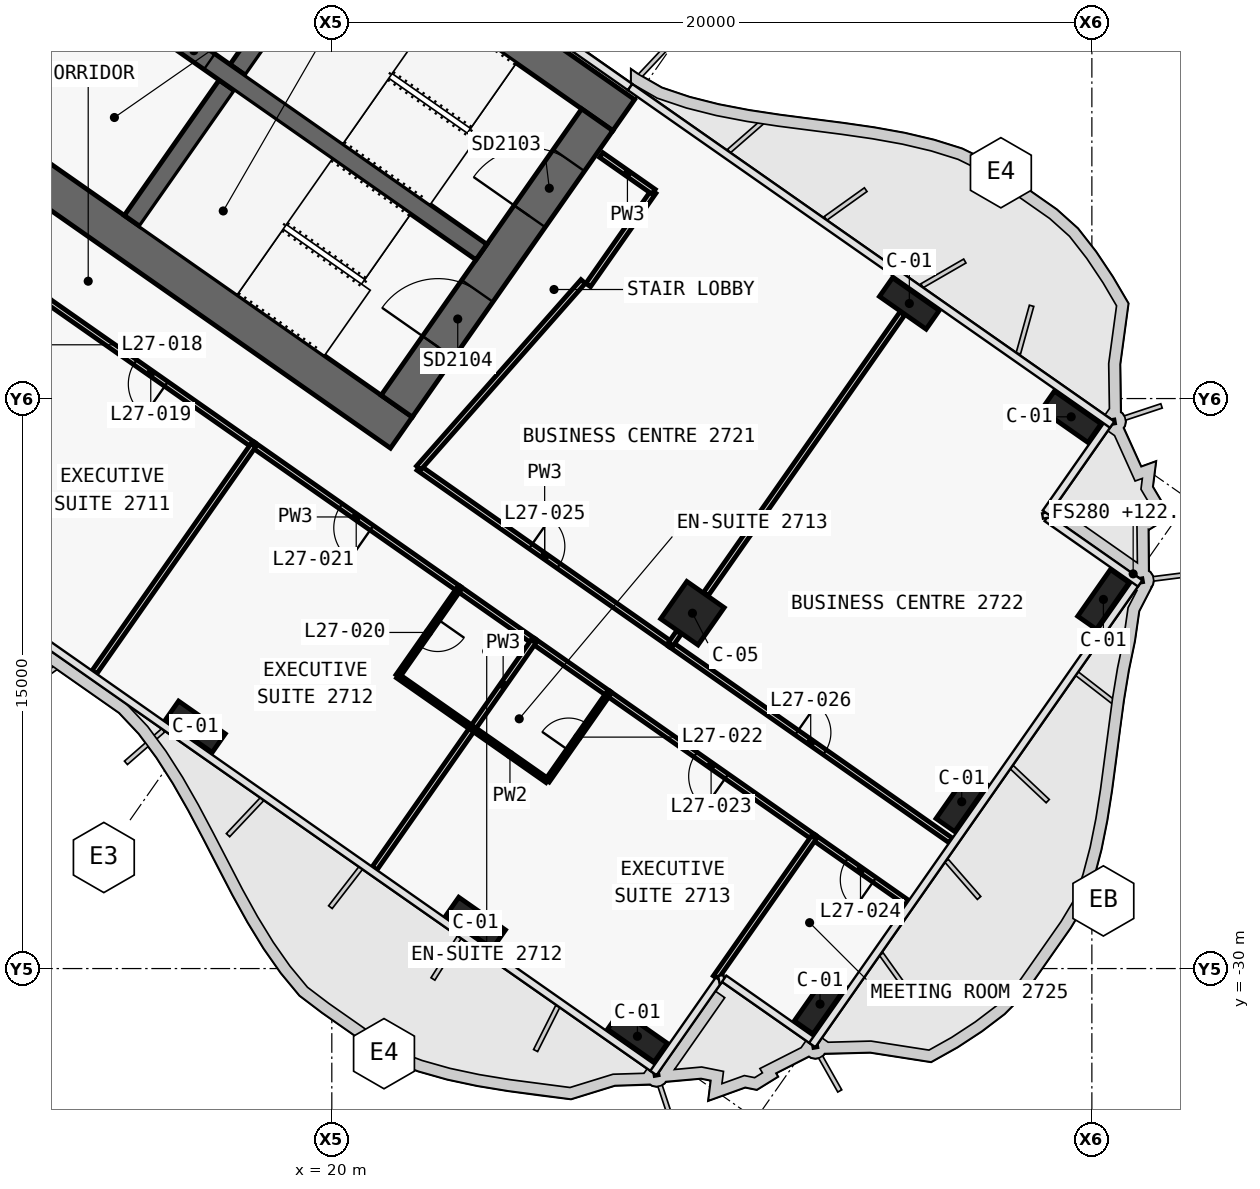
"""IFC4 building model, lengths in metres.
Left out: names, types, materials, properties, quantities, classifications, styles, units other than length and angle.
Written with IfcOpenShell. Run it as: python <this file> out.ifc"""

import sys

from ifc_helpers import new_model, si_unit, direction, frame, frame_2d, origin, origin_2d, place, context, subcontext, project, spatial, polyline, rectangle, outline, extrude, element, fill, save


model = new_model("IFC4")
c1 = context("Model", 3, precision=1e-05, world=origin(), true_north=direction((0.0, 1.0)))
c2 = subcontext(c1, "Body", "Model", "MODEL_VIEW")
j1 = project(units=[si_unit("LENGTHUNIT", "METRE"), si_unit("PLANEANGLEUNIT", "RADIAN")], contexts=[c1])
p1 = place(None, origin())
s1 = spatial("IfcSite", under=j1, at=p1, CompositionType="ELEMENT")
p2 = place(p1, origin())
s2 = spatial("IfcBuilding", under=s1, at=p2, CompositionType="ELEMENT")
p3 = place(p2, frame((0.0, 0.0, 122.9)))
s3 = spatial("IfcBuildingStorey", under=s2, at=p3, CompositionType="ELEMENT", Elevation=122.9)
p4 = place(p3, frame((-0.037, 11.867, 0.0), z_axis=(0.0, 0.0, 1.0), x_axis=(0.819155306259, -0.573571777746, 0.0)))
e1 = element("IfcWall", 1, at=p4, inside=s3, PredefinedType="SHEAR", context=c2, shape_type="SweptSolid", body=[
    extrude(outline(polyline([(33.837, 0.5), (0.0, 0.5), (0.7, -0.5), (33.837, -0.5), (33.837, 0.5)])), origin(), (0.0, 0.0, 1.0), 3.6),
])
p5 = place(p3, frame((-0.037, -0.585, 0.0), z_axis=(0.0, 0.0, 1.0), x_axis=(0.819157152511, -0.573569140985, 0.0)))
e2 = element("IfcWall", 2, at=p5, inside=s3, PredefinedType="SHEAR", context=c2, shape_type="SweptSolid", body=[
    extrude(outline(polyline([(26.695, 0.5), (0.0, 0.5), (0.7, -0.5), (26.695, -0.5), (26.695, 0.5)])), origin(), (0.0, 0.0, 1.0), 3.6),
])
p6 = place(p5, frame((1.245, 0.0, 0.0)))
e3 = element("IfcOpeningElement", 3, at=p6, cuts=e2, PredefinedType="OPENING", context=c2, shape_type="SweptSolid", body=[
    extrude(rectangle(XDim=1.5, YDim=2.1, at=frame_2d((0.75, 1.05))), frame((0.0, 0.51, 0.0), z_axis=(0.0, -1.0, 0.0), x_axis=(1.0, 0.0, 0.0)), (0.0, 0.0, 1.0), 1.02),
])
p7 = place(p5, frame((12.445, 0.0, 0.0)))
e4 = element("IfcOpeningElement", 4, at=p7, cuts=e2, PredefinedType="OPENING", context=c2, shape_type="SweptSolid", body=[
    extrude(rectangle(XDim=1.5, YDim=2.1, at=frame_2d((0.75, 1.05))), frame((0.0, 0.51, 0.0), z_axis=(0.0, -1.0, 0.0), x_axis=(1.0, 0.0, 0.0)), (0.0, 0.0, 1.0), 1.02),
])
p8 = place(p3, frame((21.708, -15.2, 0.0), z_axis=(0.0, 0.0, 1.0), x_axis=(0.573576324356, 0.819152122709, 0.0)))
e5 = element("IfcWall", 5, at=p8, inside=s3, PredefinedType="SHEAR", context=c2, shape_type="SweptSolid", body=[
    extrude(outline(polyline([(9.2, 0.5), (0.0, 0.5), (0.0, -0.5), (9.2, -0.5), (9.2, 0.5)])), origin(), (0.0, 0.0, 1.0), 3.6),
])
p9 = place(p8, frame((6.1, 0.0, 0.0)))
e6 = element("IfcOpeningElement", 6, at=p9, cuts=e5, PredefinedType="OPENING", context=c2, shape_type="SweptSolid", body=[
    extrude(rectangle(XDim=1.8, YDim=2.1, at=frame_2d((0.9, 1.05))), frame((0.0, 0.51, 0.0), z_axis=(0.0, -1.0, 0.0), x_axis=(1.0, 0.0, 0.0)), (0.0, 0.0, 1.0), 1.02),
])
p10 = place(p8, frame((1.9, 0.0, 0.0)))
e7 = element("IfcOpeningElement", 7, at=p10, cuts=e5, PredefinedType="OPENING", context=c2, shape_type="SweptSolid", body=[
    extrude(rectangle(XDim=1.8, YDim=2.1, at=frame_2d((0.9, 1.05))), frame((0.0, 0.51, 0.0), z_axis=(0.0, -1.0, 0.0), x_axis=(1.0, 0.0, 0.0)), (0.0, 0.0, 1.0), 1.02),
])
p11 = place(p3, frame((14.745, -10.324, 0.0), z_axis=(0.0, 0.0, 1.0), x_axis=(0.57356780395, 0.819158088694, 0.0)))
e8 = element("IfcWall", 8, at=p11, inside=s3, PredefinedType="SHEAR", context=c2, shape_type="SweptSolid", body=[
    extrude(outline(polyline([(0.0, 0.25), (0.0, -0.25), (4.35, -0.25), (4.35, 0.25), (0.0, 0.25)])), origin(), (0.0, 0.0, 1.0), 3.6),
])
p12 = place(p3, frame((17.527, -6.352, 0.0), z_axis=(0.0, 0.0, 1.0), x_axis=(0.573530143085, 0.819184457233, 0.0)))
e9 = element("IfcWall", 9, at=p12, inside=s3, PredefinedType="SHEAR", context=c2, shape_type="SweptSolid", body=[
    extrude(outline(polyline([(4.35, -0.25), (4.35, 0.25), (0.0, 0.25), (0.0, -0.25), (4.35, -0.25)])), origin(), (0.0, 0.0, 1.0), 3.6),
])
p13 = place(p3, frame((2.638, 3.768, 0.0), z_axis=(0.0, 0.0, 1.0), x_axis=(0.819148977158, -0.573580816643, 0.0)))
e10 = element("IfcWall", 10, at=p13, inside=s3, PredefinedType="SHEAR", context=c2, shape_type="SweptSolid", body=[
    extrude(outline(polyline([(0.0, 0.25), (0.0, -0.25), (26.0, -0.25), (26.0, 0.25), (0.0, 0.25)])), origin(), (0.0, 0.0, 1.0), 3.6),
])
p14 = place(p13, frame((9.637, 0.0, 0.0)))
e11 = element("IfcOpeningElement", 11, at=p14, cuts=e10, PredefinedType="OPENING", context=c2, shape_type="SweptSolid", body=[
    extrude(rectangle(XDim=1.2, YDim=2.1, at=frame_2d((0.6, 1.05))), frame((0.0, 0.26, 0.0), z_axis=(0.0, -1.0, 0.0), x_axis=(1.0, 0.0, 0.0)), (0.0, 0.0, 1.0), 0.52),
])
p15 = place(p13, frame((11.812, 0.0, 0.0)))
e12 = element("IfcOpeningElement", 12, at=p15, cuts=e10, PredefinedType="OPENING", context=c2, shape_type="SweptSolid", body=[
    extrude(rectangle(XDim=1.2, YDim=2.1, at=frame_2d((0.6, 1.05))), frame((0.0, 0.26, 0.0), z_axis=(0.0, -1.0, 0.0), x_axis=(1.0, 0.0, 0.0)), (0.0, 0.0, 1.0), 0.52),
])
p16 = place(p13, frame((13.988, 0.0, 0.0)))
e13 = element("IfcOpeningElement", 13, at=p16, cuts=e10, PredefinedType="OPENING", context=c2, shape_type="SweptSolid", body=[
    extrude(rectangle(XDim=1.2, YDim=2.1, at=frame_2d((0.6, 1.05))), frame((0.0, 0.26, 0.0), z_axis=(0.0, -1.0, 0.0), x_axis=(1.0, 0.0, 0.0)), (0.0, 0.0, 1.0), 0.52),
])
p17 = place(p13, frame((16.262, 0.0, 0.0)))
e14 = element("IfcOpeningElement", 14, at=p17, cuts=e10, PredefinedType="OPENING", context=c2, shape_type="SweptSolid", body=[
    extrude(rectangle(XDim=1.0, YDim=2.1, at=frame_2d((0.5, 1.05))), frame((0.0, 0.26, 0.0), z_axis=(0.0, -1.0, 0.0), x_axis=(1.0, 0.0, 0.0)), (0.0, 0.0, 1.0), 0.52),
])
for number, where, z_axis, x_axis in (
    (15, (16.41, -23.637, 0.0), (0.0, 0.0, 1.0), (0.819, -0.574, 0.0)),
    (16, (23.782, -28.799, 0.0), (0.0, 0.0, 1.0), (0.819, -0.574, 0.0)),
    (17, (28.042, -31.782, 0.0), (0.0, 0.0, 1.0), (0.819, -0.574, 0.0)),
    (18, (35.197, -12.498, 0.0), (0.0, 0.0, 1.0), (0.819, -0.574, 0.0)),
    (19, (39.456, -15.481, 0.0), (0.0, 0.0, 1.0), (0.819, -0.574, 0.0)),
    (20, (32.847, -30.935, 0.0), (0.0, 0.0, 1.0), (0.574, 0.819, 0.0)),
    (21, (36.575, -25.61, 0.0), (0.0, 0.0, 1.0), (0.574, 0.819, 0.0)),
    (22, (40.303, -20.286, 0.0), (0.0, 0.0, 1.0), (0.574, 0.819, 0.0)),
):
    element("IfcColumn", number, at=place(p3, frame(where, z_axis=z_axis, x_axis=x_axis)), inside=s3, PredefinedType="COLUMN", context=c2, shape_type="SweptSolid", body=[
        extrude(rectangle(XDim=1.5, YDim=0.6, at=origin_2d()), origin(), (0.0, 0.0, 1.0), 3.6),
    ])
p18 = place(p3, frame((29.49, -20.649, 0.0), z_axis=(0.0, 0.0, 1.0), x_axis=(0.819152044289, -0.573576436351, 0.0)))
e23 = element("IfcColumn", 23, at=p18, inside=s3, PredefinedType="COLUMN", context=c2, shape_type="SweptSolid", body=[
    extrude(rectangle(XDim=1.2, YDim=1.2, at=origin_2d()), origin(), (0.0, 0.0, 1.0), 3.6),
])
p19 = place(p3, frame((22.284, -16.824, 0.0), z_axis=(0.0, 0.0, 1.0), x_axis=(0.819152599934, -0.573575642807, 0.0)))
e24 = element("IfcWall", 24, at=p19, inside=s3, PredefinedType="PARTITIONING", context=c2, shape_type="SweptSolid", body=[
    extrude(rectangle(XDim=8.098, YDim=0.15, at=frame_2d((4.049, 0.0))), origin(), (0.0, 0.0, 1.0), 2.6),
])
p20 = place(p19, frame((3.599, 0.0, 0.0)))
e25 = element("IfcOpeningElement", 25, at=p20, cuts=e24, PredefinedType="OPENING", context=c2, shape_type="SweptSolid", body=[
    extrude(rectangle(XDim=0.9, YDim=2.1, at=frame_2d((0.45, 1.05))), frame((0.0, 0.085, 0.0), z_axis=(0.0, -1.0, 0.0), x_axis=(1.0, 0.0, 0.0)), (0.0, 0.0, 1.0), 0.17),
])
p21 = place(p3, frame((28.914, -21.467, 0.0), z_axis=(0.0, 0.0, 1.0), x_axis=(0.81915291695, -0.57357519006, 0.0)))
e26 = element("IfcWall", 26, at=p21, inside=s3, PredefinedType="PARTITIONING", context=c2, shape_type="SweptSolid", body=[
    extrude(rectangle(XDim=9.002, YDim=0.15, at=frame_2d((4.501, 0.0))), origin(), (0.0, 0.0, 1.0), 2.5),
])
p22 = place(p21, frame((4.051, 0.0, 0.0)))
e27 = element("IfcOpeningElement", 27, at=p22, cuts=e26, PredefinedType="OPENING", context=c2, shape_type="SweptSolid", body=[
    extrude(rectangle(XDim=0.9, YDim=2.1, at=frame_2d((0.45, 1.05))), frame((0.0, 0.085, 0.0), z_axis=(0.0, -1.0, 0.0), x_axis=(1.0, 0.0, 0.0)), (0.0, 0.0, 1.0), 0.17),
])
p23 = place(p3, frame((17.941, -16.224, 0.0), z_axis=(0.0, 0.0, 1.0), x_axis=(-0.819153746897, 0.573574004767, 0.0)))
e28 = element("IfcWall", 28, at=p23, inside=s3, PredefinedType="PARTITIONING", context=c2, shape_type="SweptSolid", body=[
    extrude(rectangle(XDim=6.603, YDim=0.15, at=frame_2d((3.302, 0.0))), origin(), (0.0, 0.0, 1.0), 2.6),
])
p24 = place(p23, frame((2.802, 0.0, 0.0)))
e29 = element("IfcOpeningElement", 29, at=p24, cuts=e28, PredefinedType="OPENING", context=c2, shape_type="SweptSolid", body=[
    extrude(rectangle(XDim=1.0, YDim=2.1, at=frame_2d((0.5, 1.05))), frame((0.0, 0.085, 0.0), z_axis=(0.0, -1.0, 0.0), x_axis=(1.0, 0.0, 0.0)), (0.0, 0.0, 1.0), 0.17),
])
p25 = place(p3, frame((23.346, -20.01, 0.0), z_axis=(0.0, 0.0, 1.0), x_axis=(-0.819153746897, 0.573574004767, 0.0)))
e30 = element("IfcWall", 30, at=p25, inside=s3, PredefinedType="PARTITIONING", context=c2, shape_type="SweptSolid", body=[
    extrude(rectangle(XDim=6.603, YDim=0.15, at=frame_2d((3.302, 0.0))), origin(), (0.0, 0.0, 1.0), 2.6),
])
p26 = place(p25, frame((2.801, 0.0, 0.0)))
e31 = element("IfcOpeningElement", 31, at=p26, cuts=e30, PredefinedType="OPENING", context=c2, shape_type="SweptSolid", body=[
    extrude(rectangle(XDim=1.0, YDim=2.1, at=frame_2d((0.5, 1.05))), frame((0.0, 0.085, 0.0), z_axis=(0.0, -1.0, 0.0), x_axis=(1.0, 0.0, 0.0)), (0.0, 0.0, 1.0), 0.17),
])
p27 = place(p3, frame((25.313, -21.387, 0.0), z_axis=(0.0, 0.0, 1.0), x_axis=(-0.819146032251, 0.573585022335, 0.0)))
e32 = element("IfcWall", 32, at=p27, inside=s3, PredefinedType="PARTITIONING", context=c2, shape_type="SweptSolid", body=[
    extrude(rectangle(XDim=2.404, YDim=0.15, at=frame_2d((1.202, 0.0))), origin(), (0.0, 0.0, 1.0), 3.32),
])
p28 = place(p3, frame((32.685, -26.549, 0.0), z_axis=(0.0, 0.0, 1.0), x_axis=(-0.819153746897, 0.573574004767, 0.0)))
e33 = element("IfcWall", 33, at=p28, inside=s3, PredefinedType="PARTITIONING", context=c2, shape_type="SweptSolid", body=[
    extrude(rectangle(XDim=6.603, YDim=0.15, at=frame_2d((3.302, 0.0))), origin(), (0.0, 0.0, 1.0), 2.6),
])
p29 = place(p28, frame((2.802, 0.0, 0.0)))
e34 = element("IfcOpeningElement", 34, at=p29, cuts=e33, PredefinedType="OPENING", context=c2, shape_type="SweptSolid", body=[
    extrude(rectangle(XDim=1.0, YDim=2.1, at=frame_2d((0.5, 1.05))), frame((0.0, 0.085, 0.0), z_axis=(0.0, -1.0, 0.0), x_axis=(1.0, 0.0, 0.0)), (0.0, 0.0, 1.0), 0.17),
])
p30 = place(p3, frame((27.279, -22.763, 0.0), z_axis=(0.0, 0.0, 1.0), x_axis=(-0.819146032251, 0.573585022335, 0.0)))
e35 = element("IfcWall", 35, at=p30, inside=s3, PredefinedType="PARTITIONING", context=c2, shape_type="SweptSolid", body=[
    extrude(rectangle(XDim=2.404, YDim=0.15, at=frame_2d((1.202, 0.0))), origin(), (0.0, 0.0, 1.0), 3.32),
])
p31 = place(p3, frame((35.141, -28.268, 0.0), z_axis=(0.0, 0.0, 1.0), x_axis=(-0.81915932427, 0.57356603932, 0.0)))
e36 = element("IfcWall", 36, at=p31, inside=s3, PredefinedType="PARTITIONING", context=c2, shape_type="SweptSolid", body=[
    extrude(rectangle(XDim=3.002, YDim=0.15, at=frame_2d((1.501, 0.0))), origin(), (0.0, 0.0, 1.0), 2.5),
])
p32 = place(p31, frame((1.051, 0.0, 0.0)))
e37 = element("IfcOpeningElement", 37, at=p32, cuts=e36, PredefinedType="OPENING", context=c2, shape_type="SweptSolid", body=[
    extrude(rectangle(XDim=0.9, YDim=2.1, at=frame_2d((0.45, 1.05))), frame((0.0, 0.085, 0.0), z_axis=(0.0, -1.0, 0.0), x_axis=(1.0, 0.0, 0.0)), (0.0, 0.0, 1.0), 0.17),
])
p33 = place(p3, frame((35.013, -12.76, 0.0), z_axis=(0.0, 0.0, 1.0), x_axis=(-0.573558725113, -0.819164445546, 0.0)))
e38 = element("IfcWall", 38, at=p33, inside=s3, PredefinedType="PARTITIONING", context=c2, shape_type="SweptSolid", body=[
    extrude(rectangle(XDim=9.01, YDim=0.15, at=frame_2d((4.505, 0.0))), origin(), (0.0, 0.0, 1.0), 2.6),
])
p34 = place(p3, frame((29.134, -21.156, 0.0), z_axis=(0.0, 0.0, 1.0), x_axis=(-0.572944929411, -0.819593867633, 0.0)))
e39 = element("IfcWall", 39, at=p34, inside=s3, PredefinedType="PARTITIONING", context=c2, shape_type="SweptSolid", body=[
    extrude(rectangle(XDim=0.38, YDim=0.15, at=frame_2d((0.19, 0.0))), origin(), (0.0, 0.0, 1.0), 2.6),
])
p35 = place(p3, frame((22.285, -16.825, 0.0), z_axis=(0.0, 0.0, 1.0), x_axis=(0.661551268245, 0.749899939647, 0.0)))
e40 = element("IfcWall", 40, at=p35, inside=s3, PredefinedType="PARTITIONING", context=c2, shape_type="SweptSolid", body=[
    extrude(rectangle(XDim=6.541, YDim=0.15, at=frame_2d((3.271, 0.0))), origin(), (0.0, 0.0, 1.0), 2.6),
])
p36 = place(p3, frame((26.746, -12.014, 0.0), z_axis=(0.0, 0.0, 1.0), x_axis=(0.573560650686, 0.819163097304, 0.0)))
e41 = element("IfcWall", 41, at=p36, inside=s3, PredefinedType="PARTITIONING", context=c2, shape_type="SweptSolid", body=[
    extrude(rectangle(XDim=3.0, YDim=0.15, at=frame_2d((1.5, 0.0))), origin(), (0.0, 0.0, 1.0), 3.32),
])
p37 = place(p3, frame((28.467, -9.556, 0.0), z_axis=(0.0, 0.0, 1.0), x_axis=(-0.819109000826, 0.573637903879, 0.0)))
e42 = element("IfcWall", 42, at=p37, inside=s3, PredefinedType="PARTITIONING", context=c2, shape_type="SweptSolid", body=[
    extrude(rectangle(XDim=1.68, YDim=0.15, at=frame_2d((0.84, 0.0))), origin(), (0.0, 0.0, 1.0), 3.32),
])
p38 = place(p3, frame((17.939, -16.223, 0.0), z_axis=(0.0, 0.0, 1.0), x_axis=(-0.573594765376, -0.819139209862, 0.0)))
e43 = element("IfcWall", 43, at=p38, inside=s3, PredefinedType="PARTITIONING", context=c2, shape_type="SweptSolid", body=[
    extrude(rectangle(XDim=7.3, YDim=0.15, at=frame_2d((3.65, 0.0))), origin(), (0.0, 0.0, 1.0), 2.5),
])
p39 = place(p3, frame((23.344, -20.008, 0.0), z_axis=(0.0, 0.0, 1.0), x_axis=(-0.573550118428, -0.819170471667, 0.0)))
e44 = element("IfcWall", 44, at=p39, inside=s3, PredefinedType="PARTITIONING", context=c2, shape_type="SweptSolid", body=[
    extrude(rectangle(XDim=2.8, YDim=0.12, at=frame_2d((1.4, 0.0))), origin(), (0.0, 0.0, 1.0), 3.32),
])
p40 = place(p39, frame((0.975, 0.0, 0.0)))
e45 = element("IfcOpeningElement", 45, at=p40, cuts=e44, PredefinedType="OPENING", context=c2, shape_type="SweptSolid", body=[
    extrude(rectangle(XDim=0.85, YDim=2.05, at=frame_2d((0.425, 1.025))), frame((0.0, 0.07, 0.0), z_axis=(0.0, -1.0, 0.0), x_axis=(1.0, 0.0, 0.0)), (0.0, 0.0, 1.0), 0.14),
])
p41 = place(p3, frame((21.739, -22.303, 0.0), z_axis=(0.0, 0.0, 1.0), x_axis=(0.819107643868, -0.573639841501, 0.0)))
e46 = element("IfcWall", 46, at=p41, inside=s3, PredefinedType="PARTITIONING", context=c2, shape_type="SweptSolid", body=[
    extrude(rectangle(XDim=2.4, YDim=0.12, at=frame_2d((1.2, 0.0))), origin(), (0.0, 0.0, 1.0), 3.32),
])
p42 = place(p3, frame((23.705, -23.68, 0.0), z_axis=(0.0, 0.0, 1.0), x_axis=(-0.573553393703, -0.819168178442, 0.0)))
e47 = element("IfcWall", 47, at=p42, inside=s3, PredefinedType="PARTITIONING", context=c2, shape_type="SweptSolid", body=[
    extrude(rectangle(XDim=4.499, YDim=0.15, at=frame_2d((2.25, 0.0))), origin(), (0.0, 0.0, 1.0), 2.5),
])
p43 = place(p3, frame((25.311, -21.385, 0.0), z_axis=(0.0, 0.0, 1.0), x_axis=(-0.573550118428, -0.819170471667, 0.0)))
e48 = element("IfcWall", 48, at=p43, inside=s3, PredefinedType="PARTITIONING", context=c2, shape_type="SweptSolid", body=[
    extrude(rectangle(XDim=2.8, YDim=0.15, at=frame_2d((1.4, 0.0))), origin(), (0.0, 0.0, 1.0), 3.32),
])
p44 = place(p3, frame((23.705, -23.68, 0.0), z_axis=(0.0, 0.0, 1.0), x_axis=(0.819188907105, -0.573523787192, 0.0)))
e49 = element("IfcWall", 49, at=p44, inside=s3, PredefinedType="PARTITIONING", context=c2, shape_type="SweptSolid", body=[
    extrude(rectangle(XDim=2.4, YDim=0.12, at=frame_2d((1.2, 0.0))), origin(), (0.0, 0.0, 1.0), 3.32),
])
p45 = place(p3, frame((25.672, -25.056, 0.0), z_axis=(0.0, 0.0, 1.0), x_axis=(0.573550118428, 0.819170471667, 0.0)))
e50 = element("IfcWall", 50, at=p45, inside=s3, PredefinedType="PARTITIONING", context=c2, shape_type="SweptSolid", body=[
    extrude(rectangle(XDim=2.8, YDim=0.12, at=frame_2d((1.4, 0.0))), origin(), (0.0, 0.0, 1.0), 3.32),
])
p46 = place(p45, frame((0.975, 0.0, 0.0)))
e51 = element("IfcOpeningElement", 51, at=p46, cuts=e50, PredefinedType="OPENING", context=c2, shape_type="SweptSolid", body=[
    extrude(rectangle(XDim=0.85, YDim=2.05, at=frame_2d((0.425, 1.025))), frame((0.0, 0.07, 0.0), z_axis=(0.0, -1.0, 0.0), x_axis=(1.0, 0.0, 0.0)), (0.0, 0.0, 1.0), 0.14),
])
p47 = place(p3, frame((32.684, -26.548, 0.0), z_axis=(0.0, 0.0, 1.0), x_axis=(-0.573564243949, -0.819160581365, 0.0)))
e52 = element("IfcWall", 52, at=p47, inside=s3, PredefinedType="PARTITIONING", context=c2, shape_type="SweptSolid", body=[
    extrude(rectangle(XDim=4.502, YDim=0.15, at=frame_2d((2.251, 0.0))), origin(), (0.0, 0.0, 1.0), 3.32),
])
p48 = place(p17, origin())
e53 = element("IfcDoor", 53, at=p48, inside=s3, OperationType="SINGLE_SWING_RIGHT", PredefinedType="DOOR", context=c2, shape_type="SweptSolid", body=[
    extrude(rectangle(XDim=1.0, YDim=2.1, at=frame_2d((0.5, 1.05))), frame((0.0, 0.025, 0.0), z_axis=(0.0, -1.0, 0.0), x_axis=(1.0, 0.0, 0.0)), (0.0, 0.0, 1.0), 0.05),
])
fill(e14, e53)
p49 = place(p9, origin())
e54 = element("IfcDoor", 54, at=p49, inside=s3, OperationType="DOUBLE_DOOR_SINGLE_SWING", PredefinedType="DOOR", context=c2, shape_type="SweptSolid", body=[
    extrude(rectangle(XDim=1.8, YDim=2.1, at=frame_2d((0.9, 1.05))), frame((0.0, 0.025, 0.0), z_axis=(0.0, -1.0, 0.0), x_axis=(1.0, 0.0, 0.0)), (0.0, 0.0, 1.0), 0.05),
])
fill(e6, e54)
p50 = place(p10, origin())
e55 = element("IfcDoor", 55, at=p50, inside=s3, OperationType="DOUBLE_DOOR_SINGLE_SWING", PredefinedType="DOOR", context=c2, shape_type="SweptSolid", body=[
    extrude(rectangle(XDim=1.8, YDim=2.1, at=frame_2d((0.9, 1.05))), frame((0.0, 0.025, 0.0), z_axis=(0.0, -1.0, 0.0), x_axis=(1.0, 0.0, 0.0)), (0.0, 0.0, 1.0), 0.05),
])
fill(e7, e55)
p51 = place(p24, origin())
e56 = element("IfcDoor", 56, at=p51, inside=s3, OperationType="SINGLE_SWING_RIGHT", PredefinedType="DOOR", context=c2, shape_type="SweptSolid", body=[
    extrude(rectangle(XDim=1.0, YDim=2.1, at=frame_2d((0.5, 1.05))), frame((0.0, 0.025, 0.0), z_axis=(0.0, -1.0, 0.0), x_axis=(1.0, 0.0, 0.0)), (0.0, 0.0, 1.0), 0.05),
])
fill(e29, e56)
p52 = place(p40, origin())
e57 = element("IfcDoor", 57, at=p52, inside=s3, OperationType="SINGLE_SWING_RIGHT", PredefinedType="DOOR", context=c2, shape_type="SweptSolid", body=[
    extrude(rectangle(XDim=0.85, YDim=2.05, at=frame_2d((0.425, 1.025))), frame((0.0, 0.025, 0.0), z_axis=(0.0, -1.0, 0.0), x_axis=(1.0, 0.0, 0.0)), (0.0, 0.0, 1.0), 0.05),
])
fill(e45, e57)
p53 = place(p26, origin())
e58 = element("IfcDoor", 58, at=p53, inside=s3, OperationType="SINGLE_SWING_RIGHT", PredefinedType="DOOR", context=c2, shape_type="SweptSolid", body=[
    extrude(rectangle(XDim=1.0, YDim=2.1, at=frame_2d((0.5, 1.05))), frame((0.0, 0.025, 0.0), z_axis=(0.0, -1.0, 0.0), x_axis=(1.0, 0.0, 0.0)), (0.0, 0.0, 1.0), 0.05),
])
fill(e31, e58)
p54 = place(p46, origin())
e59 = element("IfcDoor", 59, at=p54, inside=s3, OperationType="SINGLE_SWING_RIGHT", PredefinedType="DOOR", context=c2, shape_type="SweptSolid", body=[
    extrude(rectangle(XDim=0.85, YDim=2.05, at=frame_2d((0.425, 1.025))), frame((0.0, 0.025, 0.0), z_axis=(0.0, -1.0, 0.0), x_axis=(1.0, 0.0, 0.0)), (0.0, 0.0, 1.0), 0.05),
])
fill(e51, e59)
p55 = place(p29, origin())
e60 = element("IfcDoor", 60, at=p55, inside=s3, OperationType="SINGLE_SWING_RIGHT", PredefinedType="DOOR", context=c2, shape_type="SweptSolid", body=[
    extrude(rectangle(XDim=1.0, YDim=2.1, at=frame_2d((0.5, 1.05))), frame((0.0, 0.025, 0.0), z_axis=(0.0, -1.0, 0.0), x_axis=(1.0, 0.0, 0.0)), (0.0, 0.0, 1.0), 0.05),
])
fill(e34, e60)
p56 = place(p32, origin())
e61 = element("IfcDoor", 61, at=p56, inside=s3, OperationType="SINGLE_SWING_LEFT", PredefinedType="DOOR", context=c2, shape_type="SweptSolid", body=[
    extrude(rectangle(XDim=0.9, YDim=2.1, at=frame_2d((0.45, 1.05))), frame((0.0, 0.025, 0.0), z_axis=(0.0, -1.0, 0.0), x_axis=(1.0, 0.0, 0.0)), (0.0, 0.0, 1.0), 0.05),
])
fill(e37, e61)
p57 = place(p20, origin())
e62 = element("IfcDoor", 62, at=p57, inside=s3, OperationType="SINGLE_SWING_LEFT", PredefinedType="DOOR", context=c2, shape_type="SweptSolid", body=[
    extrude(rectangle(XDim=0.9, YDim=2.1, at=frame_2d((0.45, 1.05))), frame((0.0, 0.025, 0.0), z_axis=(0.0, -1.0, 0.0), x_axis=(1.0, 0.0, 0.0)), (0.0, 0.0, 1.0), 0.05),
])
fill(e25, e62)
p58 = place(p22, origin())
e63 = element("IfcDoor", 63, at=p58, inside=s3, OperationType="SINGLE_SWING_LEFT", PredefinedType="DOOR", context=c2, shape_type="SweptSolid", body=[
    extrude(rectangle(XDim=0.9, YDim=2.1, at=frame_2d((0.45, 1.05))), frame((0.0, 0.025, 0.0), z_axis=(0.0, -1.0, 0.0), x_axis=(1.0, 0.0, 0.0)), (0.0, 0.0, 1.0), 0.05),
])
fill(e27, e63)
save(model, sys.argv[1])
